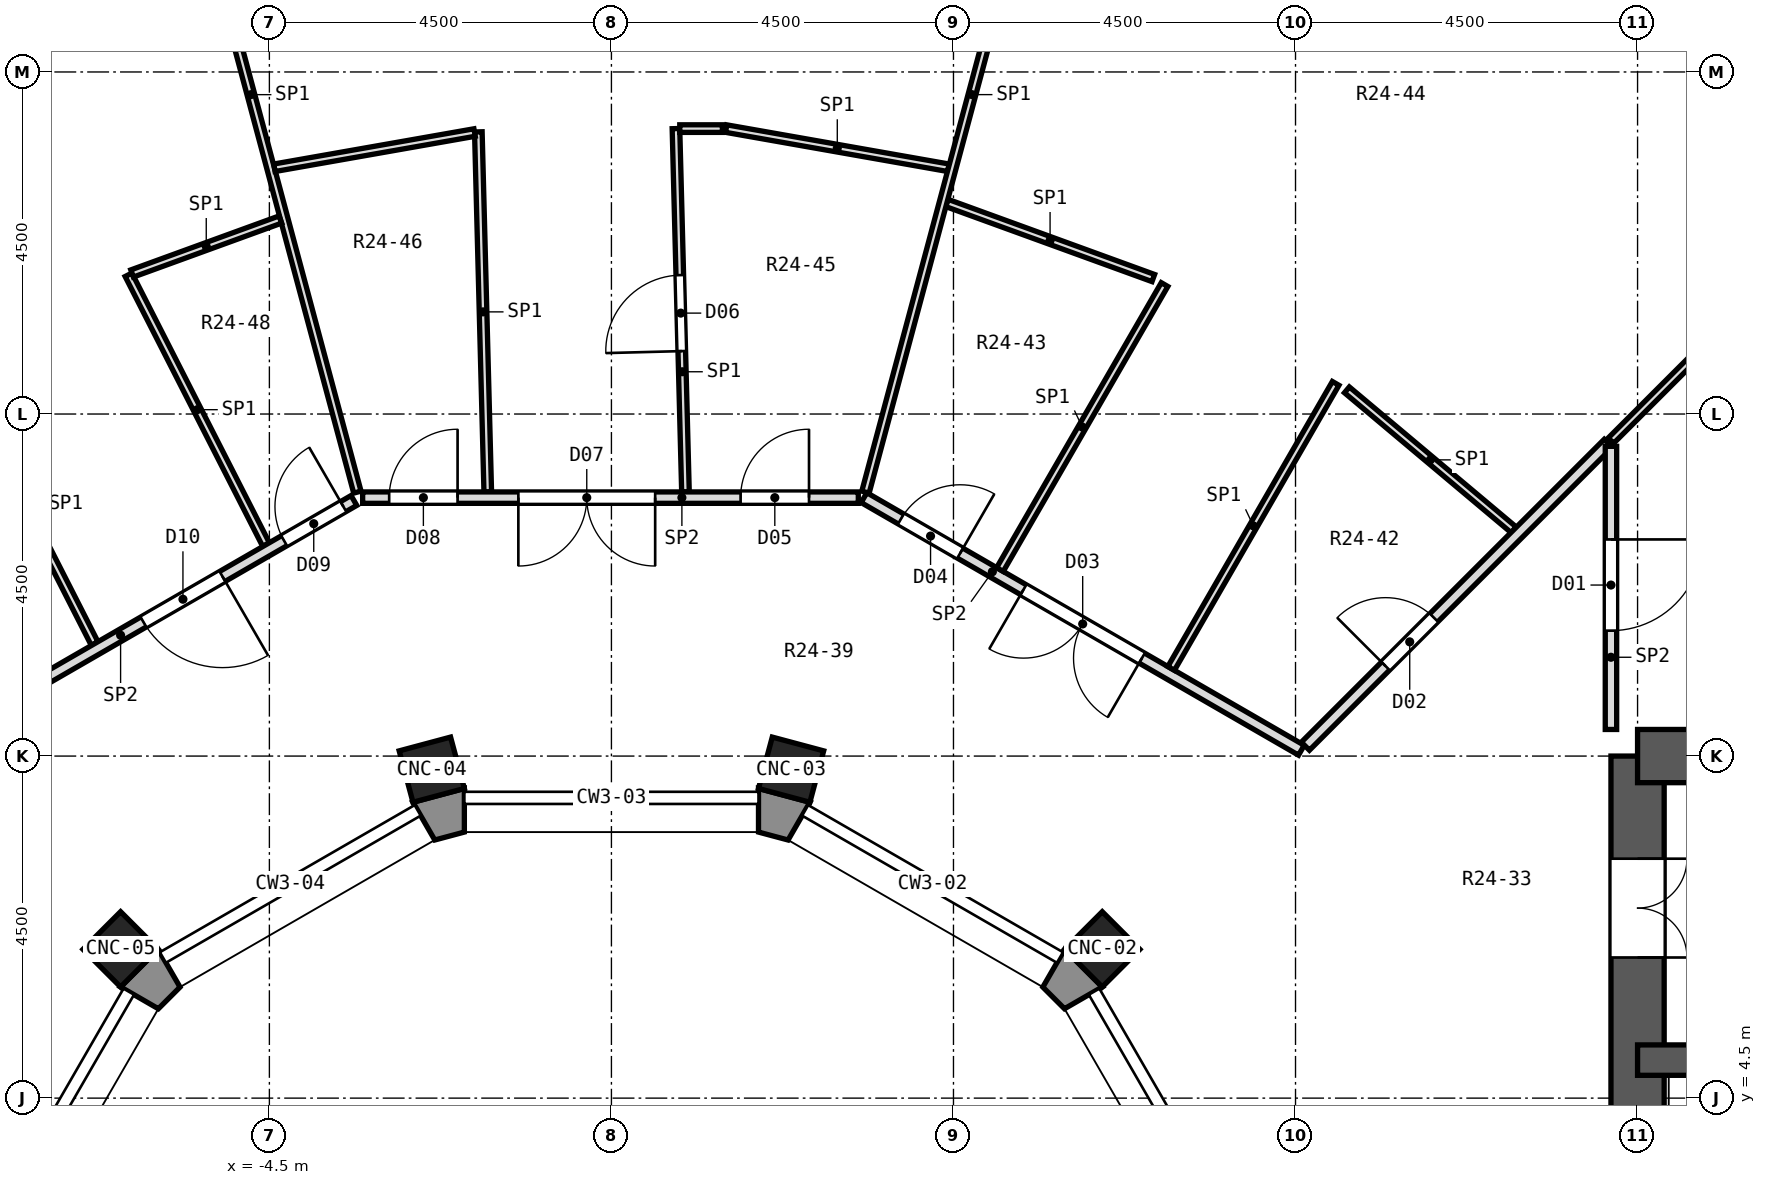
"""IFC4 building model, lengths in metres.
Left out: names, types, materials, properties, quantities, classifications, styles, units other than length and angle.
Written with IfcOpenShell. Run it as: python <this file> out.ifc"""

import sys

from ifc_helpers import new_model, si_unit, direction, frame, frame_2d, origin, origin_2d, place, context, subcontext, project, spatial, polyline, rectangle, outline, extrude, element, fill, save


model = new_model("IFC4")
c1 = context("Model", 3, precision=1e-05, world=origin(), true_north=direction((0.0, 1.0)))
c2 = subcontext(c1, "Body", "Model", "MODEL_VIEW")
j1 = project(units=[si_unit("LENGTHUNIT", "METRE"), si_unit("PLANEANGLEUNIT", "RADIAN")], contexts=[c1])
p1 = place(None, origin())
s1 = spatial("IfcSite", under=j1, at=p1, CompositionType="ELEMENT")
p2 = place(p1, origin())
s2 = spatial("IfcBuilding", under=s1, at=p2, CompositionType="ELEMENT")
p3 = place(p2, frame((0.0, 0.0, 155.8)))
s3 = spatial("IfcBuildingStorey", under=s2, at=p3, CompositionType="ELEMENT", Elevation=155.8)
for number, where, z_axis, x_axis in (
    (1, (6.458, 6.458, 0.0), (0.0, 0.0, 1.0), (0.707, 0.707, 0.0)),
    (2, (2.364, 8.821, 0.0), (0.0, 0.0, 1.0), (0.259, 0.966, 0.0)),
    (3, (-2.364, 8.821, 0.0), (0.0, 0.0, 1.0), (-0.259, 0.966, 0.0)),
    (4, (-6.458, 6.458, 0.0), (0.0, 0.0, 1.0), (-0.707, 0.707, 0.0)),
):
    element("IfcColumn", number, at=place(p3, frame(where, z_axis=z_axis, x_axis=x_axis)), inside=s3, PredefinedType="COLUMN", context=c2, shape_type="SweptSolid", body=[
        extrude(rectangle(XDim=0.7, YDim=0.7, at=origin_2d()), origin(), (0.0, 0.0, 1.0), 5.0),
    ])
p4 = place(p3, frame((13.5, -9.0, 0.0), z_axis=(0.0, 0.0, 1.0), x_axis=(0.0, 1.0, 0.0)))
e5 = element("IfcWall", 5, at=p4, inside=s3, PredefinedType="SHEAR", context=c2, shape_type="SweptSolid", body=[
    extrude(rectangle(XDim=18.0, YDim=0.7, at=frame_2d((9.0, 0.0))), origin(), (0.0, 0.0, 1.0), 5.0),
])
p5 = place(p4, frame((15.35, 0.0, 0.0)))
e6 = element("IfcOpeningElement", 6, at=p5, cuts=e5, PredefinedType="OPENING", context=c2, shape_type="SweptSolid", body=[
    extrude(rectangle(XDim=1.3, YDim=2.1, at=frame_2d((0.65, 1.05))), frame((0.0, 0.362, 0.0), z_axis=(0.0, -1.0, 0.0), x_axis=(1.0, 0.0, 0.0)), (0.0, 0.0, 1.0), 0.724),
])
p6 = place(p4, frame((1.35, 0.0, 0.0)))
e7 = element("IfcOpeningElement", 7, at=p6, cuts=e5, PredefinedType="OPENING", context=c2, shape_type="SweptSolid", body=[
    extrude(rectangle(XDim=1.3, YDim=2.1, at=frame_2d((0.65, 1.05))), frame((0.0, 0.362, 0.0), z_axis=(0.0, -1.0, 0.0), x_axis=(1.0, 0.0, 0.0)), (0.0, 0.0, 1.0), 0.724),
])
p7 = place(p4, frame((7.5, 0.0, 0.0)))
e8 = element("IfcOpeningElement", 8, at=p7, cuts=e5, PredefinedType="OPENING", context=c2, shape_type="SweptSolid", body=[
    extrude(rectangle(XDim=3.0, YDim=2.4, at=frame_2d((1.5, 1.2))), frame((0.0, 0.362, 0.0), z_axis=(0.0, -1.0, 0.0), x_axis=(1.0, 0.0, 0.0)), (0.0, 0.0, 1.0), 0.724),
])
p8 = place(p3, frame((13.5, 9.0, 0.0), z_axis=(0.0, 0.0, 1.0), x_axis=(1.0, 0.0, 0.0)))
e9 = element("IfcWall", 9, at=p8, inside=s3, PredefinedType="SHEAR", context=c2, shape_type="SweptSolid", body=[
    extrude(rectangle(XDim=8.0, YDim=0.7, at=frame_2d((4.0, 0.0))), origin(), (0.0, 0.0, 1.0), 5.0),
])
p9 = place(p3, frame((13.5, 5.0, 0.0), z_axis=(0.0, 0.0, 1.0), x_axis=(1.0, 0.0, 0.0)))
e10 = element("IfcWall", 10, at=p9, inside=s3, PredefinedType="SHEAR", context=c2, shape_type="SweptSolid", body=[
    extrude(rectangle(XDim=8.0, YDim=0.4, at=frame_2d((4.0, 0.0))), origin(), (0.0, 0.0, 1.0), 5.0),
])
p10 = place(p3, origin())
e11 = element("IfcWall", 11, at=p10, inside=s3, PredefinedType="SOLIDWALL", context=c2, shape_type="SweptSolid", body=[
    extrude(outline(polyline([(5.962, 6.458), (5.676, 5.961), (5.961, 5.676), (6.458, 5.962), (5.962, 6.458)])), origin(), (0.0, 0.0, 1.0), 4.55),
])
p11 = place(p3, origin())
e12 = element("IfcWall", 12, at=p11, inside=s3, PredefinedType="SOLIDWALL", context=c2, shape_type="SweptSolid", body=[
    extrude(outline(polyline([(1.935, 8.573), (1.935, 8.0), (2.324, 7.896), (2.611, 8.392), (1.935, 8.573)])), origin(), (0.0, 0.0, 1.0), 4.55),
])
p12 = place(p3, origin())
e13 = element("IfcWall", 13, at=p12, inside=s3, PredefinedType="SOLIDWALL", context=c2, shape_type="SweptSolid", body=[
    extrude(outline(polyline([(-1.935, 8.0), (-1.935, 8.573), (-2.611, 8.392), (-2.324, 7.896), (-1.935, 8.0)])), origin(), (0.0, 0.0, 1.0), 4.55),
])
p13 = place(p3, origin())
e14 = element("IfcWall", 14, at=p13, inside=s3, PredefinedType="SOLIDWALL", context=c2, shape_type="SweptSolid", body=[
    extrude(outline(polyline([(-6.458, 5.962), (-5.961, 5.676), (-5.676, 5.961), (-5.962, 6.458), (-6.458, 5.962)])), origin(), (0.0, 0.0, 1.0), 4.55),
])
p14 = place(p3, frame((-1.751, 17.212, 0.0), z_axis=(0.0, 0.0, 1.0), x_axis=(0.026173897622, -0.999657404856, 0.0)))
e15 = element("IfcWall", 15, at=p14, inside=s3, PredefinedType="PARTITIONING", context=c2, shape_type="SweptSolid", body=[
    extrude(rectangle(XDim=4.739, YDim=0.1, at=frame_2d((2.369, 0.0))), origin(), (0.0, 0.0, 1.0), 4.55),
])
p15 = place(p3, frame((0.849, 17.255, 0.0), z_axis=(0.0, 0.0, 1.0), x_axis=(0.0261428648, -0.999658216902, 0.0)))
e16 = element("IfcWall", 16, at=p15, inside=s3, PredefinedType="PARTITIONING", context=c2, shape_type="SweptSolid", body=[
    extrude(rectangle(XDim=4.781, YDim=0.1, at=frame_2d((2.391, 0.0))), origin(), (0.0, 0.0, 1.0), 4.55),
])
p16 = place(p15, frame((1.928, 0.0, 0.0)))
e17 = element("IfcOpeningElement", 17, at=p16, cuts=e16, PredefinedType="OPENING", context=c2, shape_type="SweptSolid", body=[
    extrude(rectangle(XDim=1.0, YDim=2.1, at=frame_2d((0.5, 1.05))), frame((0.0, 0.062, 0.0), z_axis=(0.0, -1.0, 0.0), x_axis=(1.0, 0.0, 0.0)), (0.0, 0.0, 1.0), 0.124),
])
p17 = place(p3, frame((-6.144, 22.931, 0.0), z_axis=(0.0, 0.0, 1.0), x_axis=(0.258715046682, -0.965953686582, 0.0)))
e18 = element("IfcWall", 18, at=p17, inside=s3, PredefinedType="PARTITIONING", context=c2, shape_type="SweptSolid", body=[
    extrude(rectangle(XDim=10.828, YDim=0.1, at=frame_2d((5.414, 0.0))), origin(), (0.0, 0.0, 1.0), 4.55),
])
p18 = place(p3, frame((-8.665, 14.142, 0.0), z_axis=(0.0, 0.0, 1.0), x_axis=(0.453972049437, -0.891015924847, 0.0)))
e19 = element("IfcWall", 19, at=p18, inside=s3, PredefinedType="PARTITIONING", context=c2, shape_type="SweptSolid", body=[
    extrude(rectangle(XDim=4.11, YDim=0.1, at=frame_2d((2.055, 0.0))), origin(), (0.0, 0.0, 1.0), 4.55),
])
p19 = place(p3, frame((-6.353, 15.332, 0.0), z_axis=(0.0, 0.0, 1.0), x_axis=(0.454013892244, -0.890994604725, 0.0)))
e20 = element("IfcWall", 20, at=p19, inside=s3, PredefinedType="PARTITIONING", context=c2, shape_type="SweptSolid", body=[
    extrude(rectangle(XDim=3.985, YDim=0.1, at=frame_2d((1.992, 0.0))), origin(), (0.0, 0.0, 1.0), 4.55),
])
p20 = place(p3, frame((9.676, 13.818, 0.0), z_axis=(0.0, 0.0, 1.0), x_axis=(0.765988490515, -0.64285428551, 0.0)))
e21 = element("IfcWall", 21, at=p20, inside=s3, PredefinedType="PARTITIONING", context=c2, shape_type="SweptSolid", body=[
    extrude(rectangle(XDim=2.865, YDim=0.1, at=frame_2d((1.433, 0.0))), origin(), (0.0, 0.0, 1.0), 4.55),
])
p21 = place(p3, frame((3.323, 12.4, 0.0), z_axis=(0.0, 0.0, 1.0), x_axis=(0.865961614908, -0.500110469302, 0.0)))
e22 = element("IfcWall", 22, at=p21, inside=s3, PredefinedType="PARTITIONING", context=c2, shape_type="SweptSolid", body=[
    extrude(rectangle(XDim=6.645, YDim=0.15, at=frame_2d((3.322, 0.0))), origin(), (0.0, 0.0, 1.0), 4.55),
])
p22 = place(p21, frame((2.422, 0.0, 0.0)))
e23 = element("IfcOpeningElement", 23, at=p22, cuts=e22, PredefinedType="OPENING", context=c2, shape_type="SweptSolid", body=[
    extrude(rectangle(XDim=1.8, YDim=2.1, at=frame_2d((0.9, 1.05))), frame((0.0, 0.087, 0.0), z_axis=(0.0, -1.0, 0.0), x_axis=(1.0, 0.0, 0.0)), (0.0, 0.0, 1.0), 0.174),
])
p23 = place(p21, frame((0.561, 0.0, 0.0)))
e24 = element("IfcOpeningElement", 24, at=p23, cuts=e22, PredefinedType="OPENING", context=c2, shape_type="SweptSolid", body=[
    extrude(rectangle(XDim=0.9, YDim=2.1, at=frame_2d((0.45, 1.05))), frame((0.0, 0.087, 0.0), z_axis=(0.0, -1.0, 0.0), x_axis=(1.0, 0.0, 0.0)), (0.0, 0.0, 1.0), 0.174),
])
p24 = place(p3, frame((4.413, 16.277, 0.0), z_axis=(0.0, 0.0, 1.0), x_axis=(0.939768755, -0.341810893809, 0.0)))
e25 = element("IfcWall", 25, at=p24, inside=s3, PredefinedType="PARTITIONING", context=c2, shape_type="SweptSolid", body=[
    extrude(rectangle(XDim=2.89, YDim=0.1, at=frame_2d((1.445, 0.0))), origin(), (0.0, 0.0, 1.0), 4.55),
])
p25 = place(p3, frame((1.51, 17.255, 0.0), z_axis=(0.0, 0.0, 1.0), x_axis=(0.984831536916, -0.173513238385, 0.0)))
e26 = element("IfcWall", 26, at=p25, inside=s3, PredefinedType="PARTITIONING", context=c2, shape_type="SweptSolid", body=[
    extrude(rectangle(XDim=2.969, YDim=0.1, at=frame_2d((1.484, 0.0))), origin(), (0.0, 0.0, 1.0), 4.55),
])
p26 = place(p3, frame((-3.273, 12.4, 0.0), z_axis=(0.0, 0.0, 1.0), x_axis=(1.0, 0.0, 0.0)))
e27 = element("IfcWall", 27, at=p26, inside=s3, PredefinedType="PARTITIONING", context=c2, shape_type="SweptSolid", body=[
    extrude(rectangle(XDim=6.521, YDim=0.15, at=frame_2d((3.26, 0.0))), origin(), (0.0, 0.0, 1.0), 4.55),
])
p27 = place(p26, frame((4.972, 0.0, 0.0)))
e28 = element("IfcOpeningElement", 28, at=p27, cuts=e27, PredefinedType="OPENING", context=c2, shape_type="SweptSolid", body=[
    extrude(rectangle(XDim=0.9, YDim=2.1, at=frame_2d((0.45, 1.05))), frame((0.0, 0.087, 0.0), z_axis=(0.0, -1.0, 0.0), x_axis=(1.0, 0.0, 0.0)), (0.0, 0.0, 1.0), 0.174),
])
p28 = place(p26, frame((2.049, 0.0, 0.0)))
e29 = element("IfcOpeningElement", 29, at=p28, cuts=e27, PredefinedType="OPENING", context=c2, shape_type="SweptSolid", body=[
    extrude(rectangle(XDim=1.8, YDim=2.1, at=frame_2d((0.9, 1.05))), frame((0.0, 0.087, 0.0), z_axis=(0.0, -1.0, 0.0), x_axis=(1.0, 0.0, 0.0)), (0.0, 0.0, 1.0), 0.174),
])
p29 = place(p26, frame((0.349, 0.0, 0.0)))
e30 = element("IfcOpeningElement", 30, at=p29, cuts=e27, PredefinedType="OPENING", context=c2, shape_type="SweptSolid", body=[
    extrude(rectangle(XDim=0.9, YDim=2.1, at=frame_2d((0.45, 1.05))), frame((0.0, 0.087, 0.0), z_axis=(0.0, -1.0, 0.0), x_axis=(1.0, 0.0, 0.0)), (0.0, 0.0, 1.0), 0.174),
])
p30 = place(p3, frame((0.899, 17.255, 0.0), z_axis=(0.0, 0.0, 1.0), x_axis=(1.0, 0.0, 0.0)))
e31 = element("IfcWall", 31, at=p30, inside=s3, PredefinedType="PARTITIONING", context=c2, shape_type="SweptSolid", body=[
    extrude(rectangle(XDim=0.561, YDim=0.1, at=frame_2d((0.281, 0.0))), origin(), (0.0, 0.0, 1.0), 4.55),
])
p31 = place(p3, frame((-4.434, 16.74, 0.0), z_axis=(0.0, 0.0, 1.0), x_axis=(0.984855167118, 0.173379063906, 0.0)))
e32 = element("IfcWall", 32, at=p31, inside=s3, PredefinedType="PARTITIONING", context=c2, shape_type="SweptSolid", body=[
    extrude(rectangle(XDim=2.674, YDim=0.1, at=frame_2d((1.337, 0.0))), origin(), (0.0, 0.0, 1.0), 4.55),
])
p32 = place(p3, frame((-6.306, 15.349, 0.0), z_axis=(0.0, 0.0, 1.0), x_axis=(0.939748778635, 0.341865811474, 0.0)))
e33 = element("IfcWall", 33, at=p32, inside=s3, PredefinedType="PARTITIONING", context=c2, shape_type="SweptSolid", body=[
    extrude(rectangle(XDim=2.076, YDim=0.1, at=frame_2d((1.038, 0.0))), origin(), (0.0, 0.0, 1.0), 4.55),
])
p33 = place(p3, frame((-9.012, 9.115, 0.0), z_axis=(0.0, 0.0, 1.0), x_axis=(0.865967095912, 0.5001009786, 0.0)))
e34 = element("IfcWall", 34, at=p33, inside=s3, PredefinedType="PARTITIONING", context=c2, shape_type="SweptSolid", body=[
    extrude(rectangle(XDim=6.495, YDim=0.15, at=frame_2d((3.248, 0.0))), origin(), (0.0, 0.0, 1.0), 4.55),
])
p34 = place(p33, frame((5.434, 0.0, 0.0)))
e35 = element("IfcOpeningElement", 35, at=p34, cuts=e34, PredefinedType="OPENING", context=c2, shape_type="SweptSolid", body=[
    extrude(rectangle(XDim=0.9, YDim=2.1, at=frame_2d((0.45, 1.05))), frame((0.0, 0.087, 0.0), z_axis=(0.0, -1.0, 0.0), x_axis=(1.0, 0.0, 0.0)), (0.0, 0.0, 1.0), 0.174),
])
p35 = place(p33, frame((3.297, 0.0, 0.0)))
e36 = element("IfcOpeningElement", 36, at=p35, cuts=e34, PredefinedType="OPENING", context=c2, shape_type="SweptSolid", body=[
    extrude(rectangle(XDim=1.2, YDim=2.1, at=frame_2d((0.6, 1.05))), frame((0.0, 0.087, 0.0), z_axis=(0.0, -1.0, 0.0), x_axis=(1.0, 0.0, 0.0)), (0.0, 0.0, 1.0), 0.174),
])
p36 = place(p3, frame((13.15, 13.15, 0.0), z_axis=(0.0, 0.0, 1.0), x_axis=(0.707106781187, 0.707106781187, 0.0)))
e37 = element("IfcWall", 37, at=p36, inside=s3, PredefinedType="PARTITIONING", context=c2, shape_type="SweptSolid", body=[
    extrude(rectangle(XDim=5.143, YDim=0.1, at=frame_2d((2.572, 0.0))), origin(), (0.0, 0.0, 1.0), 4.55),
])
p37 = place(p3, frame((9.13, 9.13, 0.0), z_axis=(0.0, 0.0, 1.0), x_axis=(0.707106781187, 0.707106781187, 0.0)))
e38 = element("IfcWall", 38, at=p37, inside=s3, PredefinedType="PARTITIONING", context=c2, shape_type="SweptSolid", body=[
    extrude(rectangle(XDim=5.635, YDim=0.15, at=frame_2d((2.817, 0.0))), origin(), (0.0, 0.0, 1.0), 4.55),
])
p38 = place(p37, frame((1.491, 0.0, 0.0)))
e39 = element("IfcOpeningElement", 39, at=p38, cuts=e38, PredefinedType="OPENING", context=c2, shape_type="SweptSolid", body=[
    extrude(rectangle(XDim=0.9, YDim=2.1, at=frame_2d((0.45, 1.05))), frame((0.0, 0.087, 0.0), z_axis=(0.0, -1.0, 0.0), x_axis=(1.0, 0.0, 0.0)), (0.0, 0.0, 1.0), 0.174),
])
p39 = place(p3, frame((7.364, 10.153, 0.0), z_axis=(0.0, 0.0, 1.0), x_axis=(0.499911184982, 0.866076675087, 0.0)))
e40 = element("IfcWall", 40, at=p39, inside=s3, PredefinedType="PARTITIONING", context=c2, shape_type="SweptSolid", body=[
    extrude(rectangle(XDim=4.33, YDim=0.1, at=frame_2d((2.165, 0.0))), origin(), (0.0, 0.0, 1.0), 4.55),
])
p40 = place(p3, frame((5.112, 11.454, 0.0), z_axis=(0.0, 0.0, 1.0), x_axis=(0.500178009373, 0.865922605629, 0.0)))
e41 = element("IfcWall", 41, at=p40, inside=s3, PredefinedType="PARTITIONING", context=c2, shape_type="SweptSolid", body=[
    extrude(rectangle(XDim=4.33, YDim=0.1, at=frame_2d((2.165, 0.0))), origin(), (0.0, 0.0, 1.0), 4.55),
])
p41 = place(p3, frame((3.342, 12.472, 0.0), z_axis=(0.0, 0.0, 1.0), x_axis=(0.258741720617, 0.965946542005, 0.0)))
e42 = element("IfcWall", 42, at=p41, inside=s3, PredefinedType="PARTITIONING", context=c2, shape_type="SweptSolid", body=[
    extrude(rectangle(XDim=10.827, YDim=0.1, at=frame_2d((5.414, 0.0))), origin(), (0.0, 0.0, 1.0), 4.55),
])
p42 = place(p3, frame((13.15, 9.35, 0.0), z_axis=(0.0, 0.0, 1.0), x_axis=(0.0, 1.0, 0.0)))
e43 = element("IfcWall", 43, at=p42, inside=s3, PredefinedType="PARTITIONING", context=c2, shape_type="SweptSolid", body=[
    extrude(rectangle(XDim=3.725, YDim=0.15, at=frame_2d((1.862, 0.0))), origin(), (0.0, 0.0, 1.0), 4.55),
])
p43 = place(p42, frame((1.3, 0.0, 0.0)))
e44 = element("IfcOpeningElement", 44, at=p43, cuts=e43, PredefinedType="OPENING", context=c2, shape_type="SweptSolid", body=[
    extrude(rectangle(XDim=1.2, YDim=2.1, at=frame_2d((0.6, 1.05))), frame((0.0, 0.087, 0.0), z_axis=(0.0, -1.0, 0.0), x_axis=(1.0, 0.0, 0.0)), (0.0, 0.0, 1.0), 0.174),
])
p44 = place(p43, frame((1.2, 0.0, 0.0), z_axis=(0.0, 0.0, 1.0), x_axis=(-1.0, 0.0, 0.0)))
e45 = element("IfcDoor", 45, at=p44, inside=s3, OperationType="SINGLE_SWING_LEFT", PredefinedType="DOOR", context=c2, shape_type="SweptSolid", body=[
    extrude(rectangle(XDim=1.2, YDim=2.1, at=frame_2d((0.6, 1.05))), frame((0.0, 0.025, 0.0), z_axis=(0.0, -1.0, 0.0), x_axis=(1.0, 0.0, 0.0)), (0.0, 0.0, 1.0), 0.05),
])
fill(e44, e45)
p45 = place(p38, origin())
e46 = element("IfcDoor", 46, at=p45, inside=s3, OperationType="SINGLE_SWING_LEFT", PredefinedType="DOOR", context=c2, shape_type="SweptSolid", body=[
    extrude(rectangle(XDim=0.9, YDim=2.1, at=frame_2d((0.45, 1.05))), frame((0.0, 0.025, 0.0), z_axis=(0.0, -1.0, 0.0), x_axis=(1.0, 0.0, 0.0)), (0.0, 0.0, 1.0), 0.05),
])
fill(e39, e46)
p46 = place(p22, frame((1.8, 0.0, 0.0), z_axis=(0.0, 0.0, 1.0), x_axis=(-1.0, 0.0, 0.0)))
e47 = element("IfcDoor", 47, at=p46, inside=s3, OperationType="DOUBLE_DOOR_SINGLE_SWING", PredefinedType="DOOR", context=c2, shape_type="SweptSolid", body=[
    extrude(rectangle(XDim=1.8, YDim=2.1, at=frame_2d((0.9, 1.05))), frame((0.0, 0.025, 0.0), z_axis=(0.0, -1.0, 0.0), x_axis=(1.0, 0.0, 0.0)), (0.0, 0.0, 1.0), 0.05),
])
fill(e23, e47)
p47 = place(p23, origin())
e48 = element("IfcDoor", 48, at=p47, inside=s3, OperationType="SINGLE_SWING_RIGHT", PredefinedType="DOOR", context=c2, shape_type="SweptSolid", body=[
    extrude(rectangle(XDim=0.9, YDim=2.1, at=frame_2d((0.45, 1.05))), frame((0.0, 0.025, 0.0), z_axis=(0.0, -1.0, 0.0), x_axis=(1.0, 0.0, 0.0)), (0.0, 0.0, 1.0), 0.05),
])
fill(e24, e48)
p48 = place(p27, origin())
e49 = element("IfcDoor", 49, at=p48, inside=s3, OperationType="SINGLE_SWING_RIGHT", PredefinedType="DOOR", context=c2, shape_type="SweptSolid", body=[
    extrude(rectangle(XDim=0.9, YDim=2.1, at=frame_2d((0.45, 1.05))), frame((0.0, 0.025, 0.0), z_axis=(0.0, -1.0, 0.0), x_axis=(1.0, 0.0, 0.0)), (0.0, 0.0, 1.0), 0.05),
])
fill(e28, e49)
p49 = place(p16, frame((1.0, 0.0, 0.0), z_axis=(0.0, 0.0, 1.0), x_axis=(-1.0, 0.0, 0.0)))
e50 = element("IfcDoor", 50, at=p49, inside=s3, OperationType="SINGLE_SWING_LEFT", PredefinedType="DOOR", context=c2, shape_type="SweptSolid", body=[
    extrude(rectangle(XDim=1.0, YDim=2.1, at=frame_2d((0.5, 1.05))), frame((0.0, 0.025, 0.0), z_axis=(0.0, -1.0, 0.0), x_axis=(1.0, 0.0, 0.0)), (0.0, 0.0, 1.0), 0.05),
])
fill(e17, e50)
p50 = place(p28, frame((1.8, 0.0, 0.0), z_axis=(0.0, 0.0, 1.0), x_axis=(-1.0, 0.0, 0.0)))
e51 = element("IfcDoor", 51, at=p50, inside=s3, OperationType="DOUBLE_DOOR_SINGLE_SWING", PredefinedType="DOOR", context=c2, shape_type="SweptSolid", body=[
    extrude(rectangle(XDim=1.8, YDim=2.1, at=frame_2d((0.9, 1.05))), frame((0.0, 0.025, 0.0), z_axis=(0.0, -1.0, 0.0), x_axis=(1.0, 0.0, 0.0)), (0.0, 0.0, 1.0), 0.05),
])
fill(e29, e51)
p51 = place(p29, origin())
e52 = element("IfcDoor", 52, at=p51, inside=s3, OperationType="SINGLE_SWING_RIGHT", PredefinedType="DOOR", context=c2, shape_type="SweptSolid", body=[
    extrude(rectangle(XDim=0.9, YDim=2.1, at=frame_2d((0.45, 1.05))), frame((0.0, 0.025, 0.0), z_axis=(0.0, -1.0, 0.0), x_axis=(1.0, 0.0, 0.0)), (0.0, 0.0, 1.0), 0.05),
])
fill(e30, e52)
p52 = place(p34, origin())
e53 = element("IfcDoor", 53, at=p52, inside=s3, OperationType="SINGLE_SWING_RIGHT", PredefinedType="DOOR", context=c2, shape_type="SweptSolid", body=[
    extrude(rectangle(XDim=0.9, YDim=2.1, at=frame_2d((0.45, 1.05))), frame((0.0, 0.025, 0.0), z_axis=(0.0, -1.0, 0.0), x_axis=(1.0, 0.0, 0.0)), (0.0, 0.0, 1.0), 0.05),
])
fill(e35, e53)
p53 = place(p35, frame((1.2, 0.0, 0.0), z_axis=(0.0, 0.0, 1.0), x_axis=(-1.0, 0.0, 0.0)))
e54 = element("IfcDoor", 54, at=p53, inside=s3, OperationType="SINGLE_SWING_LEFT", PredefinedType="DOOR", context=c2, shape_type="SweptSolid", body=[
    extrude(rectangle(XDim=1.2, YDim=2.1, at=frame_2d((0.6, 1.05))), frame((0.0, 0.025, 0.0), z_axis=(0.0, -1.0, 0.0), x_axis=(1.0, 0.0, 0.0)), (0.0, 0.0, 1.0), 0.05),
])
fill(e36, e54)
p54 = place(p5, frame((1.3, 0.0, 0.0), z_axis=(0.0, 0.0, 1.0), x_axis=(-1.0, 0.0, 0.0)))
e55 = element("IfcDoor", 55, at=p54, inside=s3, OperationType="DOUBLE_DOOR_SINGLE_SWING", PredefinedType="DOOR", context=c2, shape_type="SweptSolid", body=[
    extrude(rectangle(XDim=1.3, YDim=2.1, at=frame_2d((0.65, 1.05))), frame((0.0, 0.025, 0.0), z_axis=(0.0, -1.0, 0.0), x_axis=(1.0, 0.0, 0.0)), (0.0, 0.0, 1.0), 0.05),
])
fill(e6, e55)
save(model, sys.argv[1])
